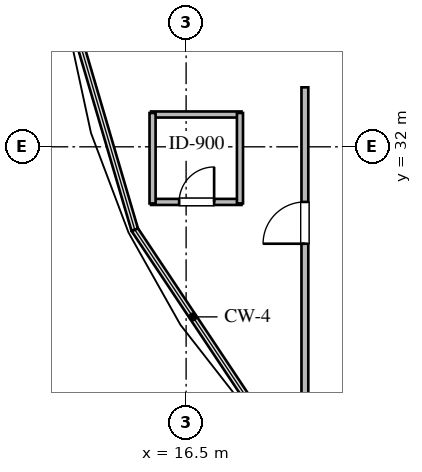
"""IFC4 building model, lengths in metres.
Left out: names, types, materials, properties, quantities, classifications, styles, units other than length and angle.
Written with IfcOpenShell. Run it as: python <this file> out.ifc"""

import sys

from ifc_helpers import new_model, si_unit, direction, frame, frame_2d, origin, place, context, subcontext, project, spatial, rectangle, extrude, element, fill, save


model = new_model("IFC4")
c1 = context("Model", 3, precision=1e-05, world=origin(), true_north=direction((0.0, 1.0)))
c2 = subcontext(c1, "Body", "Model", "MODEL_VIEW")
j1 = project(units=[si_unit("LENGTHUNIT", "METRE"), si_unit("PLANEANGLEUNIT", "RADIAN")], contexts=[c1])
p1 = place(None, origin())
s1 = spatial("IfcSite", under=j1, at=p1, CompositionType="ELEMENT")
p2 = place(p1, origin())
s2 = spatial("IfcBuilding", under=s1, at=p2, CompositionType="ELEMENT")
p3 = place(p2, frame((0.0, 0.0, 202.8)))
s3 = spatial("IfcBuildingStorey", under=s2, at=p3, CompositionType="ELEMENT", Elevation=202.8)
p4 = place(p3, frame((15.577, 30.55, 0.0), z_axis=(0.0, 0.0, 1.0), x_axis=(1.0, 0.0, 0.0)))
e1 = element("IfcWall", 1, at=p4, inside=s3, PredefinedType="PLUMBINGWALL", context=c2, shape_type="SweptSolid", body=[
    extrude(rectangle(XDim=2.38, YDim=0.16, at=frame_2d((1.19, 0.0))), origin(), (0.0, 0.0, 1.0), 3.36),
])
p5 = place(p4, frame((0.74, 0.0, 0.0)))
e2 = element("IfcOpeningElement", 2, at=p5, cuts=e1, PredefinedType="OPENING", context=c2, shape_type="SweptSolid", body=[
    extrude(rectangle(XDim=0.92, YDim=2.1, at=frame_2d((0.46, 1.05))), frame((0.0, 0.09, 0.0), z_axis=(0.0, -1.0, 0.0), x_axis=(1.0, 0.0, 0.0)), (0.0, 0.0, 1.0), 0.18),
])
p6 = place(p3, frame((15.577, 32.85, 0.0), z_axis=(0.0, 0.0, 1.0), x_axis=(1.0, 0.0, 0.0)))
e3 = element("IfcWall", 3, at=p6, inside=s3, PredefinedType="PLUMBINGWALL", context=c2, shape_type="SweptSolid", body=[
    extrude(rectangle(XDim=2.38, YDim=0.16, at=frame_2d((1.19, 0.0))), origin(), (0.0, 0.0, 1.0), 3.36),
])
p7 = place(p3, frame((15.617, 30.51, 0.0), z_axis=(0.0, 0.0, 1.0), x_axis=(0.0, 1.0, 0.0)))
e4 = element("IfcWall", 4, at=p7, inside=s3, PredefinedType="PLUMBINGWALL", context=c2, shape_type="SweptSolid", body=[
    extrude(rectangle(XDim=2.38, YDim=0.16, at=frame_2d((1.19, 0.0))), origin(), (0.0, 0.0, 1.0), 3.36),
])
p8 = place(p3, frame((17.917, 30.51, 0.0), z_axis=(0.0, 0.0, 1.0), x_axis=(0.0, 1.0, 0.0)))
e5 = element("IfcWall", 5, at=p8, inside=s3, PredefinedType="PLUMBINGWALL", context=c2, shape_type="SweptSolid", body=[
    extrude(rectangle(XDim=2.38, YDim=0.16, at=frame_2d((1.19, 0.0))), origin(), (0.0, 0.0, 1.0), 2.817),
])
p9 = place(p3, frame((19.625, 24.06, 0.0), z_axis=(0.0, 0.0, 1.0), x_axis=(0.0, 1.0, 0.0)))
e6 = element("IfcWall", 6, at=p9, inside=s3, PredefinedType="PARTITIONING", context=c2, shape_type="SweptSolid", body=[
    extrude(rectangle(XDim=9.505, YDim=0.18, at=frame_2d((4.752, 0.0))), origin(), (0.0, 0.0, 1.0), 2.817),
])
p10 = place(p9, frame((5.39, 0.0, 0.0)))
e7 = element("IfcOpeningElement", 7, at=p10, cuts=e6, PredefinedType="OPENING", context=c2, shape_type="SweptSolid", body=[
    extrude(rectangle(XDim=1.1, YDim=2.1, at=frame_2d((0.55, 1.05))), frame((0.0, 0.1, 0.0), z_axis=(0.0, -1.0, 0.0), x_axis=(1.0, 0.0, 0.0)), (0.0, 0.0, 1.0), 0.2),
])
p11 = place(p5, origin())
e8 = element("IfcDoor", 8, at=p11, inside=s3, OperationType="SINGLE_SWING_RIGHT", PredefinedType="DOOR", context=c2, shape_type="SweptSolid", body=[
    extrude(rectangle(XDim=0.92, YDim=2.1, at=frame_2d((0.46, 1.05))), frame((0.0, 0.025, 0.0), z_axis=(0.0, -1.0, 0.0), x_axis=(1.0, 0.0, 0.0)), (0.0, 0.0, 1.0), 0.05),
])
fill(e2, e8)
p12 = place(p10, origin())
e9 = element("IfcDoor", 9, at=p12, inside=s3, OperationType="SINGLE_SWING_LEFT", PredefinedType="DOOR", context=c2, shape_type="SweptSolid", body=[
    extrude(rectangle(XDim=1.1, YDim=2.1, at=frame_2d((0.55, 1.05))), frame((0.0, 0.025, 0.0), z_axis=(0.0, -1.0, 0.0), x_axis=(1.0, 0.0, 0.0)), (0.0, 0.0, 1.0), 0.05),
])
fill(e7, e9)
save(model, sys.argv[1])
